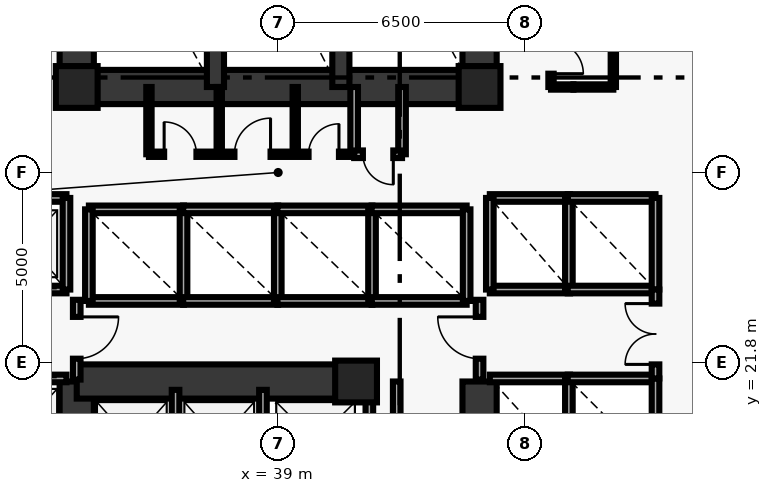
"""IFC4 building model, lengths in metres.
Left out: names, types, materials, properties, quantities, classifications, styles, units other than length and angle.
Written with IfcOpenShell. Run it as: python <this file> out.ifc"""

import sys

from ifc_helpers import new_model, si_unit, direction, frame, frame_2d, origin, origin_2d, place, context, subcontext, project, spatial, rectangle, extrude, element, fill, save


model = new_model("IFC4")
c1 = context("Model", 3, precision=1e-05, world=origin(), true_north=direction((0.0, 1.0)))
c2 = subcontext(c1, "Body", "Model", "MODEL_VIEW")
j1 = project(units=[si_unit("LENGTHUNIT", "METRE"), si_unit("PLANEANGLEUNIT", "RADIAN")], contexts=[c1])
p1 = place(None, origin())
s1 = spatial("IfcSite", under=j1, at=p1, CompositionType="ELEMENT")
p2 = place(p1, origin())
s2 = spatial("IfcBuilding", under=s1, at=p2, CompositionType="ELEMENT")
p3 = place(p2, frame((0.0, 0.0, 6.0)))
s3 = spatial("IfcBuildingStorey", under=s2, at=p3, CompositionType="ELEMENT", Elevation=6.0)
for number, where, z_axis, x_axis in (
    (1, (41.05, 21.3, 0.0), (0.0, 0.0, 1.0), (1.0, 0.0, 0.0)),
    (2, (44.3, 29.05, 0.0), (0.0, 0.0, 1.0), (1.0, 0.0, 0.0)),
    (3, (33.7, 29.05, 0.0), (0.0, 0.0, 1.0), (1.0, 0.0, 0.0)),
):
    element("IfcColumn", number, at=place(p3, frame(where, z_axis=z_axis, x_axis=x_axis)), inside=s3, PredefinedType="PILASTER", context=c2, shape_type="SweptSolid", body=[
        extrude(rectangle(XDim=1.1, YDim=1.1, at=origin_2d()), origin(), (0.0, 0.0, 1.0), 4.7),
    ])
p4 = place(p3, frame((33.7, 29.05, 0.0), z_axis=(0.0, 0.0, 1.0), x_axis=(0.0, 1.0, 0.0)))
e4 = element("IfcWall", 4, at=p4, inside=s3, PredefinedType="SHEAR", context=c2, shape_type="SweptSolid", body=[
    extrude(rectangle(XDim=8.35, YDim=0.9, at=frame_2d((4.175, 0.0))), origin(), (0.0, 0.0, 1.0), 4.7),
])
p5 = place(p3, frame((33.7, 18.35, 0.0), z_axis=(0.0, 0.0, 1.0), x_axis=(0.0, 1.0, 0.0)))
e5 = element("IfcWall", 5, at=p5, inside=s3, PredefinedType="SHEAR", context=c2, shape_type="SweptSolid", body=[
    extrude(rectangle(XDim=2.95, YDim=0.9, at=frame_2d((1.475, 0.0))), origin(), (0.0, 0.0, 1.0), 4.7),
])
p6 = place(p3, frame((44.3, 29.05, 0.0), z_axis=(0.0, 0.0, 1.0), x_axis=(0.0, 1.0, 0.0)))
e6 = element("IfcWall", 6, at=p6, inside=s3, PredefinedType="SHEAR", context=c2, shape_type="SweptSolid", body=[
    extrude(rectangle(XDim=8.35, YDim=0.9, at=frame_2d((4.175, 0.0))), origin(), (0.0, 0.0, 1.0), 4.7),
])
p7 = place(p3, frame((44.3, 18.35, 0.0), z_axis=(0.0, 0.0, 1.0), x_axis=(0.0, 1.0, 0.0)))
e7 = element("IfcWall", 7, at=p7, inside=s3, PredefinedType="SHEAR", context=c2, shape_type="SweptSolid", body=[
    extrude(rectangle(XDim=2.95, YDim=0.9, at=frame_2d((1.475, 0.0))), origin(), (0.0, 0.0, 1.0), 4.7),
])
p8 = place(p3, frame((33.7, 29.05, 0.0), z_axis=(0.0, 0.0, 1.0), x_axis=(1.0, 0.0, 0.0)))
e8 = element("IfcWall", 8, at=p8, inside=s3, PredefinedType="SHEAR", context=c2, shape_type="SweptSolid", body=[
    extrude(rectangle(XDim=10.6, YDim=0.9, at=frame_2d((5.3, 0.0))), origin(), (0.0, 0.0, 1.0), 4.7),
])
p9 = place(p3, frame((33.7, 21.3, 0.0), z_axis=(0.0, 0.0, 1.0), x_axis=(1.0, 0.0, 0.0)))
e9 = element("IfcWall", 9, at=p9, inside=s3, PredefinedType="SHEAR", context=c2, shape_type="SweptSolid", body=[
    extrude(rectangle(XDim=7.55, YDim=0.9, at=frame_2d((3.775, 0.0))), origin(), (0.0, 0.0, 1.0), 4.7),
])
for number, where, z_axis, x_axis in (
    (10, (37.35, 29.05, 0.0), (0.0, 0.0, 1.0), (0.0, 1.0, 0.0)),
    (11, (40.65, 29.05, 0.0), (0.0, 0.0, 1.0), (0.0, 1.0, 0.0)),
):
    element("IfcWall", number, at=place(p3, frame(where, z_axis=z_axis, x_axis=x_axis)), inside=s3, PredefinedType="SHEAR", context=c2, shape_type="SweptSolid", body=[
        extrude(rectangle(XDim=8.35, YDim=0.45, at=frame_2d((4.175, 0.0))), origin(), (0.0, 0.0, 1.0), 4.7),
    ])
p10 = place(p3, frame((35.6, 27.28, 0.0), z_axis=(0.0, 0.0, 1.0), x_axis=(0.0, 1.0, 0.0)))
e12 = element("IfcWall", 12, at=p10, inside=s3, PredefinedType="PARTITIONING", context=c2, shape_type="SweptSolid", body=[
    extrude(rectangle(XDim=1.77, YDim=0.14, at=frame_2d((0.885, 0.0))), origin(), (0.0, 0.0, 1.0), 4.7),
])
for number, where, z_axis, x_axis in (
    (13, (41.0, 27.28, 0.0), (0.0, 0.0, 1.0), (0.0, 1.0, 0.0)),
    (14, (42.26, 27.28, 0.0), (0.0, 0.0, 1.0), (0.0, 1.0, 0.0)),
):
    element("IfcWall", number, at=place(p3, frame(where, z_axis=z_axis, x_axis=x_axis)), inside=s3, PredefinedType="SOLIDWALL", context=c2, shape_type="SweptSolid", body=[
        extrude(rectangle(XDim=1.77, YDim=0.2, at=frame_2d((0.885, 0.0))), origin(), (0.0, 0.0, 1.0), 4.7),
    ])
p11 = place(p3, frame((41.0, 27.28, 0.0), z_axis=(0.0, 0.0, 1.0), x_axis=(1.0, 0.0, 0.0)))
e15 = element("IfcWall", 15, at=p11, inside=s3, PredefinedType="SOLIDWALL", context=c2, shape_type="SweptSolid", body=[
    extrude(rectangle(XDim=1.26, YDim=0.2, at=frame_2d((0.63, 0.0))), origin(), (0.0, 0.0, 1.0), 4.7),
])
p12 = place(p11, frame((0.23, 0.0, 0.0)))
e16 = element("IfcOpeningElement", 16, at=p12, cuts=e15, PredefinedType="OPENING", context=c2, shape_type="SweptSolid", body=[
    extrude(rectangle(XDim=0.8, YDim=2.05, at=frame_2d((0.4, 1.025))), frame((0.0, 0.11, 0.0), z_axis=(0.0, -1.0, 0.0), x_axis=(1.0, 0.0, 0.0)), (0.0, 0.0, 1.0), 0.22),
])
p13 = place(p3, frame((31.32, 23.72, 0.0), z_axis=(0.0, 0.0, 1.0), x_axis=(1.0, 0.0, 0.0)))
e17 = element("IfcWall", 17, at=p13, inside=s3, PredefinedType="SOLIDWALL", context=c2, shape_type="SweptSolid", body=[
    extrude(rectangle(XDim=2.11, YDim=0.2, at=frame_2d((1.055, 0.0))), origin(), (0.0, 0.0, 1.0), 4.7),
])
p14 = place(p13, frame((0.505, 0.0, 0.0)))
e18 = element("IfcOpeningElement", 18, at=p14, cuts=e17, PredefinedType="OPENING", context=c2, shape_type="SweptSolid", body=[
    extrude(rectangle(XDim=1.1, YDim=2.15, at=frame_2d((0.55, 1.075))), frame((0.0, 0.11, 0.0), z_axis=(0.0, -1.0, 0.0), x_axis=(1.0, 0.0, 0.0)), (0.0, 0.0, 1.0), 0.22),
])
p15 = place(p3, frame((31.32, 26.13, 0.0), z_axis=(0.0, 0.0, 1.0), x_axis=(1.0, 0.0, 0.0)))
e19 = element("IfcWall", 19, at=p15, inside=s3, PredefinedType="SOLIDWALL", context=c2, shape_type="SweptSolid", body=[
    extrude(rectangle(XDim=2.11, YDim=0.2, at=frame_2d((1.055, 0.0))), origin(), (0.0, 0.0, 1.0), 4.7),
])
p16 = place(p3, frame((33.43, 23.72, 0.0), z_axis=(0.0, 0.0, 1.0), x_axis=(0.0, 1.0, 0.0)))
e20 = element("IfcWall", 20, at=p16, inside=s3, PredefinedType="SOLIDWALL", context=c2, shape_type="SweptSolid", body=[
    extrude(rectangle(XDim=2.41, YDim=0.2, at=frame_2d((1.205, 0.0))), origin(), (0.0, 0.0, 1.0), 4.7),
])
p17 = place(p3, frame((31.32, 21.38, 0.0), z_axis=(0.0, 0.0, 1.0), x_axis=(1.0, 0.0, 0.0)))
e21 = element("IfcWall", 21, at=p17, inside=s3, PredefinedType="SOLIDWALL", context=c2, shape_type="SweptSolid", body=[
    extrude(rectangle(XDim=2.11, YDim=0.2, at=frame_2d((1.055, 0.0))), origin(), (0.0, 0.0, 1.0), 4.7),
])
p18 = place(p17, frame((0.505, 0.0, 0.0)))
e22 = element("IfcOpeningElement", 22, at=p18, cuts=e21, PredefinedType="OPENING", context=c2, shape_type="SweptSolid", body=[
    extrude(rectangle(XDim=1.1, YDim=2.15, at=frame_2d((0.55, 1.075))), frame((0.0, 0.11, 0.0), z_axis=(0.0, -1.0, 0.0), x_axis=(1.0, 0.0, 0.0)), (0.0, 0.0, 1.0), 0.22),
])
for number, where, z_axis, x_axis in (
    (23, (44.57, 23.72, 0.0), (0.0, 0.0, 1.0), (1.0, 0.0, 0.0)),
    (24, (44.57, 26.13, 0.0), (0.0, 0.0, 1.0), (1.0, 0.0, 0.0)),
):
    element("IfcWall", number, at=place(p3, frame(where, z_axis=z_axis, x_axis=x_axis)), inside=s3, PredefinedType="SOLIDWALL", context=c2, shape_type="SweptSolid", body=[
        extrude(rectangle(XDim=2.11, YDim=0.2, at=frame_2d((1.055, 0.0))), origin(), (0.0, 0.0, 1.0), 4.7),
    ])
for number, where, z_axis, x_axis in (
    (25, (44.57, 23.72, 0.0), (0.0, 0.0, 1.0), (0.0, 1.0, 0.0)),
    (26, (46.65, 23.72, 0.0), (0.0, 0.0, 1.0), (0.0, 1.0, 0.0)),
):
    element("IfcWall", number, at=place(p3, frame(where, z_axis=z_axis, x_axis=x_axis)), inside=s3, PredefinedType="SOLIDWALL", context=c2, shape_type="SweptSolid", body=[
        extrude(rectangle(XDim=2.41, YDim=0.2, at=frame_2d((1.205, 0.0))), origin(), (0.0, 0.0, 1.0), 4.7),
    ])
for number, where, z_axis, x_axis in (
    (27, (46.62, 23.72, 0.0), (0.0, 0.0, 1.0), (1.0, 0.0, 0.0)),
    (28, (46.62, 26.13, 0.0), (0.0, 0.0, 1.0), (1.0, 0.0, 0.0)),
):
    element("IfcWall", number, at=place(p3, frame(where, z_axis=z_axis, x_axis=x_axis)), inside=s3, PredefinedType="SOLIDWALL", context=c2, shape_type="SweptSolid", body=[
        extrude(rectangle(XDim=2.31, YDim=0.2, at=frame_2d((1.155, 0.0))), origin(), (0.0, 0.0, 1.0), 4.7),
    ])
p19 = place(p3, frame((48.93, 23.72, 0.0), z_axis=(0.0, 0.0, 1.0), x_axis=(0.0, 1.0, 0.0)))
e29 = element("IfcWall", 29, at=p19, inside=s3, PredefinedType="SOLIDWALL", context=c2, shape_type="SweptSolid", body=[
    extrude(rectangle(XDim=2.41, YDim=0.2, at=frame_2d((1.205, 0.0))), origin(), (0.0, 0.0, 1.0), 4.7),
])
p20 = place(p3, frame((44.57, 21.38, 0.0), z_axis=(0.0, 0.0, 1.0), x_axis=(1.0, 0.0, 0.0)))
e30 = element("IfcWall", 30, at=p20, inside=s3, PredefinedType="SOLIDWALL", context=c2, shape_type="SweptSolid", body=[
    extrude(rectangle(XDim=2.11, YDim=0.2, at=frame_2d((1.055, 0.0))), origin(), (0.0, 0.0, 1.0), 4.7),
])
for number, where, z_axis, x_axis in (
    (31, (46.65, 19.07, 0.0), (0.0, 0.0, 1.0), (0.0, 1.0, 0.0)),
    (32, (46.62, 21.38, 0.0), (0.0, 0.0, 1.0), (1.0, 0.0, 0.0)),
    (33, (48.93, 19.07, 0.0), (0.0, 0.0, 1.0), (0.0, 1.0, 0.0)),
):
    element("IfcWall", number, at=place(p3, frame(where, z_axis=z_axis, x_axis=x_axis)), inside=s3, PredefinedType="SOLIDWALL", context=c2, shape_type="SweptSolid", body=[
        extrude(rectangle(XDim=2.31, YDim=0.2, at=frame_2d((1.155, 0.0))), origin(), (0.0, 0.0, 1.0), 4.7),
    ])
for number, where, z_axis, x_axis in (
    (34, (34.02, 23.42, 0.0), (0.0, 0.0, 1.0), (1.0, 0.0, 0.0)),
    (35, (34.02, 25.83, 0.0), (0.0, 0.0, 1.0), (1.0, 0.0, 0.0)),
):
    element("IfcWall", number, at=place(p3, frame(where, z_axis=z_axis, x_axis=x_axis)), inside=s3, PredefinedType="SOLIDWALL", context=c2, shape_type="SweptSolid", body=[
        extrude(rectangle(XDim=2.5, YDim=0.2, at=frame_2d((1.25, 0.0))), origin(), (0.0, 0.0, 1.0), 4.7),
    ])
for number, where, z_axis, x_axis in (
    (36, (34.02, 23.42, 0.0), (0.0, 0.0, 1.0), (0.0, 1.0, 0.0)),
    (37, (36.51, 23.42, 0.0), (0.0, 0.0, 1.0), (0.0, 1.0, 0.0)),
):
    element("IfcWall", number, at=place(p3, frame(where, z_axis=z_axis, x_axis=x_axis)), inside=s3, PredefinedType="SOLIDWALL", context=c2, shape_type="SweptSolid", body=[
        extrude(rectangle(XDim=2.41, YDim=0.2, at=frame_2d((1.205, 0.0))), origin(), (0.0, 0.0, 1.0), 4.7),
    ])
for number, where, z_axis, x_axis in (
    (38, (36.5, 23.42, 0.0), (0.0, 0.0, 1.0), (1.0, 0.0, 0.0)),
    (39, (36.5, 25.83, 0.0), (0.0, 0.0, 1.0), (1.0, 0.0, 0.0)),
):
    element("IfcWall", number, at=place(p3, frame(where, z_axis=z_axis, x_axis=x_axis)), inside=s3, PredefinedType="SOLIDWALL", context=c2, shape_type="SweptSolid", body=[
        extrude(rectangle(XDim=2.5, YDim=0.2, at=frame_2d((1.25, 0.0))), origin(), (0.0, 0.0, 1.0), 4.7),
    ])
p21 = place(p3, frame((38.99, 23.42, 0.0), z_axis=(0.0, 0.0, 1.0), x_axis=(0.0, 1.0, 0.0)))
e40 = element("IfcWall", 40, at=p21, inside=s3, PredefinedType="SOLIDWALL", context=c2, shape_type="SweptSolid", body=[
    extrude(rectangle(XDim=2.41, YDim=0.2, at=frame_2d((1.205, 0.0))), origin(), (0.0, 0.0, 1.0), 4.7),
])
for number, where, z_axis, x_axis in (
    (41, (38.98, 23.42, 0.0), (0.0, 0.0, 1.0), (1.0, 0.0, 0.0)),
    (42, (38.98, 25.83, 0.0), (0.0, 0.0, 1.0), (1.0, 0.0, 0.0)),
):
    element("IfcWall", number, at=place(p3, frame(where, z_axis=z_axis, x_axis=x_axis)), inside=s3, PredefinedType="SOLIDWALL", context=c2, shape_type="SweptSolid", body=[
        extrude(rectangle(XDim=2.5, YDim=0.2, at=frame_2d((1.25, 0.0))), origin(), (0.0, 0.0, 1.0), 4.7),
    ])
p22 = place(p3, frame((41.47, 23.42, 0.0), z_axis=(0.0, 0.0, 1.0), x_axis=(0.0, 1.0, 0.0)))
e43 = element("IfcWall", 43, at=p22, inside=s3, PredefinedType="SOLIDWALL", context=c2, shape_type="SweptSolid", body=[
    extrude(rectangle(XDim=2.41, YDim=0.2, at=frame_2d((1.205, 0.0))), origin(), (0.0, 0.0, 1.0), 4.7),
])
for number, where, z_axis, x_axis in (
    (44, (41.46, 23.42, 0.0), (0.0, 0.0, 1.0), (1.0, 0.0, 0.0)),
    (45, (41.46, 25.83, 0.0), (0.0, 0.0, 1.0), (1.0, 0.0, 0.0)),
):
    element("IfcWall", number, at=place(p3, frame(where, z_axis=z_axis, x_axis=x_axis)), inside=s3, PredefinedType="SOLIDWALL", context=c2, shape_type="SweptSolid", body=[
        extrude(rectangle(XDim=2.5, YDim=0.2, at=frame_2d((1.25, 0.0))), origin(), (0.0, 0.0, 1.0), 4.7),
    ])
p23 = place(p3, frame((43.96, 23.42, 0.0), z_axis=(0.0, 0.0, 1.0), x_axis=(0.0, 1.0, 0.0)))
e46 = element("IfcWall", 46, at=p23, inside=s3, PredefinedType="SOLIDWALL", context=c2, shape_type="SweptSolid", body=[
    extrude(rectangle(XDim=2.41, YDim=0.2, at=frame_2d((1.205, 0.0))), origin(), (0.0, 0.0, 1.0), 4.7),
])
for number, where, z_axis, x_axis in (
    (47, (36.3, 18.37, 0.0), (0.0, 0.0, 1.0), (0.0, 1.0, 0.0)),
    (48, (38.6, 18.37, 0.0), (0.0, 0.0, 1.0), (0.0, 1.0, 0.0)),
    (49, (41.4, 18.37, 0.0), (0.0, 0.0, 1.0), (0.0, 1.0, 0.0)),
):
    element("IfcWall", number, at=place(p3, frame(where, z_axis=z_axis, x_axis=x_axis)), inside=s3, PredefinedType="SOLIDWALL", context=c2, shape_type="SweptSolid", body=[
        extrude(rectangle(XDim=2.71, YDim=0.2, at=frame_2d((1.355, 0.0))), origin(), (0.0, 0.0, 1.0), 4.7),
    ])
p24 = place(p3, frame((48.93, 21.38, 0.0), z_axis=(0.0, 0.0, 1.0), x_axis=(0.0, 1.0, 0.0)))
e50 = element("IfcWall", 50, at=p24, inside=s3, PredefinedType="SOLIDWALL", context=c2, shape_type="SweptSolid", body=[
    extrude(rectangle(XDim=2.34, YDim=0.2, at=frame_2d((1.17, 0.0))), origin(), (0.0, 0.0, 1.0), 4.7),
])
p25 = place(p24, frame((0.37, 0.0, 0.0)))
e51 = element("IfcOpeningElement", 51, at=p25, cuts=e50, PredefinedType="OPENING", context=c2, shape_type="SweptSolid", body=[
    extrude(rectangle(XDim=1.6, YDim=2.2, at=frame_2d((0.8, 1.1))), frame((0.0, 0.11, 0.0), z_axis=(0.0, -1.0, 0.0), x_axis=(1.0, 0.0, 0.0)), (0.0, 0.0, 1.0), 0.22),
])
p26 = place(p3, frame((33.7, 21.35, 0.0), z_axis=(0.0, 0.0, 1.0), x_axis=(0.0, 1.0, 0.0)))
e52 = element("IfcWall", 52, at=p26, inside=s3, PredefinedType="SOLIDWALL", context=c2, shape_type="SweptSolid", body=[
    extrude(rectangle(XDim=2.1, YDim=0.2, at=frame_2d((1.05, 0.0))), origin(), (0.0, 0.0, 1.0), 3.92),
])
p27 = place(p26, frame((0.55, 0.0, 0.0)))
e53 = element("IfcOpeningElement", 53, at=p27, cuts=e52, PredefinedType="OPENING", context=c2, shape_type="SweptSolid", body=[
    extrude(rectangle(XDim=1.1, YDim=2.15, at=frame_2d((0.55, 1.075))), frame((0.0, 0.11, 0.0), z_axis=(0.0, -1.0, 0.0), x_axis=(1.0, 0.0, 0.0)), (0.0, 0.0, 1.0), 0.22),
])
p28 = place(p3, frame((44.3, 21.35, 0.0), z_axis=(0.0, 0.0, 1.0), x_axis=(0.0, 1.0, 0.0)))
e54 = element("IfcWall", 54, at=p28, inside=s3, PredefinedType="SOLIDWALL", context=c2, shape_type="SweptSolid", body=[
    extrude(rectangle(XDim=2.1, YDim=0.2, at=frame_2d((1.05, 0.0))), origin(), (0.0, 0.0, 1.0), 3.92),
])
p29 = place(p28, frame((0.55, 0.0, 0.0)))
e55 = element("IfcOpeningElement", 55, at=p29, cuts=e54, PredefinedType="OPENING", context=c2, shape_type="SweptSolid", body=[
    extrude(rectangle(XDim=1.1, YDim=2.15, at=frame_2d((0.55, 1.075))), frame((0.0, 0.11, 0.0), z_axis=(0.0, -1.0, 0.0), x_axis=(1.0, 0.0, 0.0)), (0.0, 0.0, 1.0), 0.22),
])
p30 = place(p3, frame((42.12, 18.35, 0.0), z_axis=(0.0, 0.0, 1.0), x_axis=(0.0, 1.0, 0.0)))
e56 = element("IfcWall", 56, at=p30, inside=s3, PredefinedType="SOLIDWALL", context=c2, shape_type="SweptSolid", body=[
    extrude(rectangle(XDim=2.95, YDim=0.2, at=frame_2d((1.475, 0.0))), origin(), (0.0, 0.0, 1.0), 4.7),
])
p31 = place(p30, frame((0.2, 0.0, 0.0)))
e57 = element("IfcOpeningElement", 57, at=p31, cuts=e56, PredefinedType="OPENING", context=c2, shape_type="SweptSolid", body=[
    extrude(rectangle(XDim=0.8, YDim=2.05, at=frame_2d((0.4, 1.025))), frame((0.0, 0.11, 0.0), z_axis=(0.0, -1.0, 0.0), x_axis=(1.0, 0.0, 0.0)), (0.0, 0.0, 1.0), 0.22),
])
p32 = place(p3, frame((35.6, 27.28, 0.0), z_axis=(0.0, 0.0, 1.0), x_axis=(1.0, 0.0, 0.0)))
e58 = element("IfcWall", 58, at=p32, inside=s3, PredefinedType="PARTITIONING", context=c2, shape_type="SweptSolid", body=[
    extrude(rectangle(XDim=5.4, YDim=0.14, at=frame_2d((2.7, 0.0))), origin(), (0.0, 0.0, 1.0), 4.7),
])
p33 = place(p32, frame((0.4, 0.0, 0.0)))
e59 = element("IfcOpeningElement", 59, at=p33, cuts=e58, PredefinedType="OPENING", context=c2, shape_type="SweptSolid", body=[
    extrude(rectangle(XDim=0.85, YDim=2.1, at=frame_2d((0.425, 1.05))), frame((0.0, 0.08, 0.0), z_axis=(0.0, -1.0, 0.0), x_axis=(1.0, 0.0, 0.0)), (0.0, 0.0, 1.0), 0.16),
])
p34 = place(p32, frame((2.25, 0.0, 0.0)))
e60 = element("IfcOpeningElement", 60, at=p34, cuts=e58, PredefinedType="OPENING", context=c2, shape_type="SweptSolid", body=[
    extrude(rectangle(XDim=0.95, YDim=2.1, at=frame_2d((0.475, 1.05))), frame((0.0, 0.08, 0.0), z_axis=(0.0, -1.0, 0.0), x_axis=(1.0, 0.0, 0.0)), (0.0, 0.0, 1.0), 0.16),
])
p35 = place(p32, frame((4.2, 0.0, 0.0)))
e61 = element("IfcOpeningElement", 61, at=p35, cuts=e58, PredefinedType="OPENING", context=c2, shape_type="SweptSolid", body=[
    extrude(rectangle(XDim=0.8, YDim=2.05, at=frame_2d((0.4, 1.025))), frame((0.0, 0.08, 0.0), z_axis=(0.0, -1.0, 0.0), x_axis=(1.0, 0.0, 0.0)), (0.0, 0.0, 1.0), 0.16),
])
for number, where, z_axis, x_axis in (
    (62, (37.45, 27.28, 0.0), (0.0, 0.0, 1.0), (0.0, 1.0, 0.0)),
    (63, (39.45, 27.28, 0.0), (0.0, 0.0, 1.0), (0.0, 1.0, 0.0)),
):
    element("IfcWall", number, at=place(p3, frame(where, z_axis=z_axis, x_axis=x_axis)), inside=s3, PredefinedType="PARTITIONING", context=c2, shape_type="SweptSolid", body=[
        extrude(rectangle(XDim=1.77, YDim=0.14, at=frame_2d((0.885, 0.0))), origin(), (0.0, 0.0, 1.0), 4.7),
    ])
p36 = place(p3, frame((46.18, 34.05, 0.0), z_axis=(0.0, 0.0, 1.0), x_axis=(0.0, -1.0, 0.0)))
e64 = element("IfcWall", 64, at=p36, inside=s3, PredefinedType="PARTITIONING", context=c2, shape_type="SweptSolid", body=[
    extrude(rectangle(XDim=5.0, YDim=0.14, at=frame_2d((2.5, 0.0))), origin(), (0.0, 0.0, 1.0), 4.7),
])
p37 = place(p36, frame((3.8, 0.0, 0.0)))
e65 = element("IfcOpeningElement", 65, at=p37, cuts=e64, PredefinedType="OPENING", context=c2, shape_type="SweptSolid", body=[
    extrude(rectangle(XDim=0.85, YDim=2.1, at=frame_2d((0.425, 1.05))), frame((0.0, 0.08, 0.0), z_axis=(0.0, -1.0, 0.0), x_axis=(1.0, 0.0, 0.0)), (0.0, 0.0, 1.0), 0.16),
])
p38 = place(p36, frame((2.15, 0.0, 0.0)))
e66 = element("IfcOpeningElement", 66, at=p38, cuts=e64, PredefinedType="OPENING", context=c2, shape_type="SweptSolid", body=[
    extrude(rectangle(XDim=0.8, YDim=2.05, at=frame_2d((0.4, 1.025))), frame((0.0, 0.08, 0.0), z_axis=(0.0, -1.0, 0.0), x_axis=(1.0, 0.0, 0.0)), (0.0, 0.0, 1.0), 0.16),
])
p39 = place(p36, frame((0.45, 0.0, 0.0)))
e67 = element("IfcOpeningElement", 67, at=p39, cuts=e64, PredefinedType="OPENING", context=c2, shape_type="SweptSolid", body=[
    extrude(rectangle(XDim=0.8, YDim=2.05, at=frame_2d((0.4, 1.025))), frame((0.0, 0.08, 0.0), z_axis=(0.0, -1.0, 0.0), x_axis=(1.0, 0.0, 0.0)), (0.0, 0.0, 1.0), 0.16),
])
p40 = place(p3, frame((46.18, 29.05, 0.0), z_axis=(0.0, 0.0, 1.0), x_axis=(1.0, 0.0, 0.0)))
e68 = element("IfcWall", 68, at=p40, inside=s3, PredefinedType="PARTITIONING", context=c2, shape_type="SweptSolid", body=[
    extrude(rectangle(XDim=0.59, YDim=0.14, at=frame_2d((0.295, 0.0))), origin(), (0.0, 0.0, 1.0), 3.66),
])
p41 = place(p3, frame((46.77, 29.05, 0.0), z_axis=(0.0, 0.0, 1.0), x_axis=(1.0, 0.0, 0.0)))
e69 = element("IfcWall", 69, at=p41, inside=s3, PredefinedType="PARTITIONING", context=c2, shape_type="SweptSolid", body=[
    extrude(rectangle(XDim=1.05, YDim=0.14, at=frame_2d((0.525, 0.0))), origin(), (0.0, 0.0, 1.0), 4.7),
])
p42 = place(p3, frame((47.82, 29.05, 0.0), z_axis=(0.0, 0.0, 1.0), x_axis=(0.0, 1.0, 0.0)))
e70 = element("IfcWall", 70, at=p42, inside=s3, PredefinedType="PARTITIONING", context=c2, shape_type="SweptSolid", body=[
    extrude(rectangle(XDim=5.0, YDim=0.14, at=frame_2d((2.5, 0.0))), origin(), (0.0, 0.0, 1.0), 4.7),
])
p43 = place(p12, origin())
e71 = element("IfcDoor", 71, at=p43, inside=s3, OperationType="SINGLE_SWING_RIGHT", PredefinedType="DOOR", context=c2, shape_type="SweptSolid", body=[
    extrude(rectangle(XDim=0.8, YDim=2.05, at=frame_2d((0.4, 1.025))), frame((0.0, 0.025, 0.0), z_axis=(0.0, -1.0, 0.0), x_axis=(1.0, 0.0, 0.0)), (0.0, 0.0, 1.0), 0.05),
])
fill(e16, e71)
p44 = place(p25, origin())
e72 = element("IfcDoor", 72, at=p44, inside=s3, OperationType="DOUBLE_DOOR_SINGLE_SWING", PredefinedType="DOOR", context=c2, shape_type="SweptSolid", body=[
    extrude(rectangle(XDim=1.6, YDim=2.2, at=frame_2d((0.8, 1.1))), frame((0.0, 0.025, 0.0), z_axis=(0.0, -1.0, 0.0), x_axis=(1.0, 0.0, 0.0)), (0.0, 0.0, 1.0), 0.05),
])
fill(e51, e72)
p45 = place(p27, origin())
e73 = element("IfcDoor", 73, at=p45, inside=s3, OperationType="SINGLE_SWING_RIGHT", PredefinedType="DOOR", context=c2, shape_type="SweptSolid", body=[
    extrude(rectangle(XDim=1.1, YDim=2.15, at=frame_2d((0.55, 1.075))), frame((0.0, 0.025, 0.0), z_axis=(0.0, -1.0, 0.0), x_axis=(1.0, 0.0, 0.0)), (0.0, 0.0, 1.0), 0.05),
])
fill(e53, e73)
p46 = place(p29, origin())
e74 = element("IfcDoor", 74, at=p46, inside=s3, OperationType="SINGLE_SWING_RIGHT", PredefinedType="DOOR", context=c2, shape_type="SweptSolid", body=[
    extrude(rectangle(XDim=1.1, YDim=2.15, at=frame_2d((0.55, 1.075))), frame((0.0, 0.025, 0.0), z_axis=(0.0, -1.0, 0.0), x_axis=(1.0, 0.0, 0.0)), (0.0, 0.0, 1.0), 0.05),
])
fill(e55, e74)
p47 = place(p33, origin())
e75 = element("IfcDoor", 75, at=p47, inside=s3, OperationType="SINGLE_SWING_LEFT", PredefinedType="DOOR", context=c2, shape_type="SweptSolid", body=[
    extrude(rectangle(XDim=0.85, YDim=2.1, at=frame_2d((0.425, 1.05))), frame((0.0, 0.025, 0.0), z_axis=(0.0, -1.0, 0.0), x_axis=(1.0, 0.0, 0.0)), (0.0, 0.0, 1.0), 0.05),
])
fill(e59, e75)
p48 = place(p34, origin())
e76 = element("IfcDoor", 76, at=p48, inside=s3, OperationType="SINGLE_SWING_RIGHT", PredefinedType="DOOR", context=c2, shape_type="SweptSolid", body=[
    extrude(rectangle(XDim=0.95, YDim=2.1, at=frame_2d((0.475, 1.05))), frame((0.0, 0.025, 0.0), z_axis=(0.0, -1.0, 0.0), x_axis=(1.0, 0.0, 0.0)), (0.0, 0.0, 1.0), 0.05),
])
fill(e60, e76)
p49 = place(p35, origin())
e77 = element("IfcDoor", 77, at=p49, inside=s3, OperationType="SINGLE_SWING_RIGHT", PredefinedType="DOOR", context=c2, shape_type="SweptSolid", body=[
    extrude(rectangle(XDim=0.8, YDim=2.05, at=frame_2d((0.4, 1.025))), frame((0.0, 0.025, 0.0), z_axis=(0.0, -1.0, 0.0), x_axis=(1.0, 0.0, 0.0)), (0.0, 0.0, 1.0), 0.05),
])
fill(e61, e77)
p50 = place(p37, origin())
e78 = element("IfcDoor", 78, at=p50, inside=s3, OperationType="SINGLE_SWING_RIGHT", PredefinedType="DOOR", context=c2, shape_type="SweptSolid", body=[
    extrude(rectangle(XDim=0.85, YDim=2.1, at=frame_2d((0.425, 1.05))), frame((0.0, 0.025, 0.0), z_axis=(0.0, -1.0, 0.0), x_axis=(1.0, 0.0, 0.0)), (0.0, 0.0, 1.0), 0.05),
])
fill(e65, e78)
save(model, sys.argv[1])
